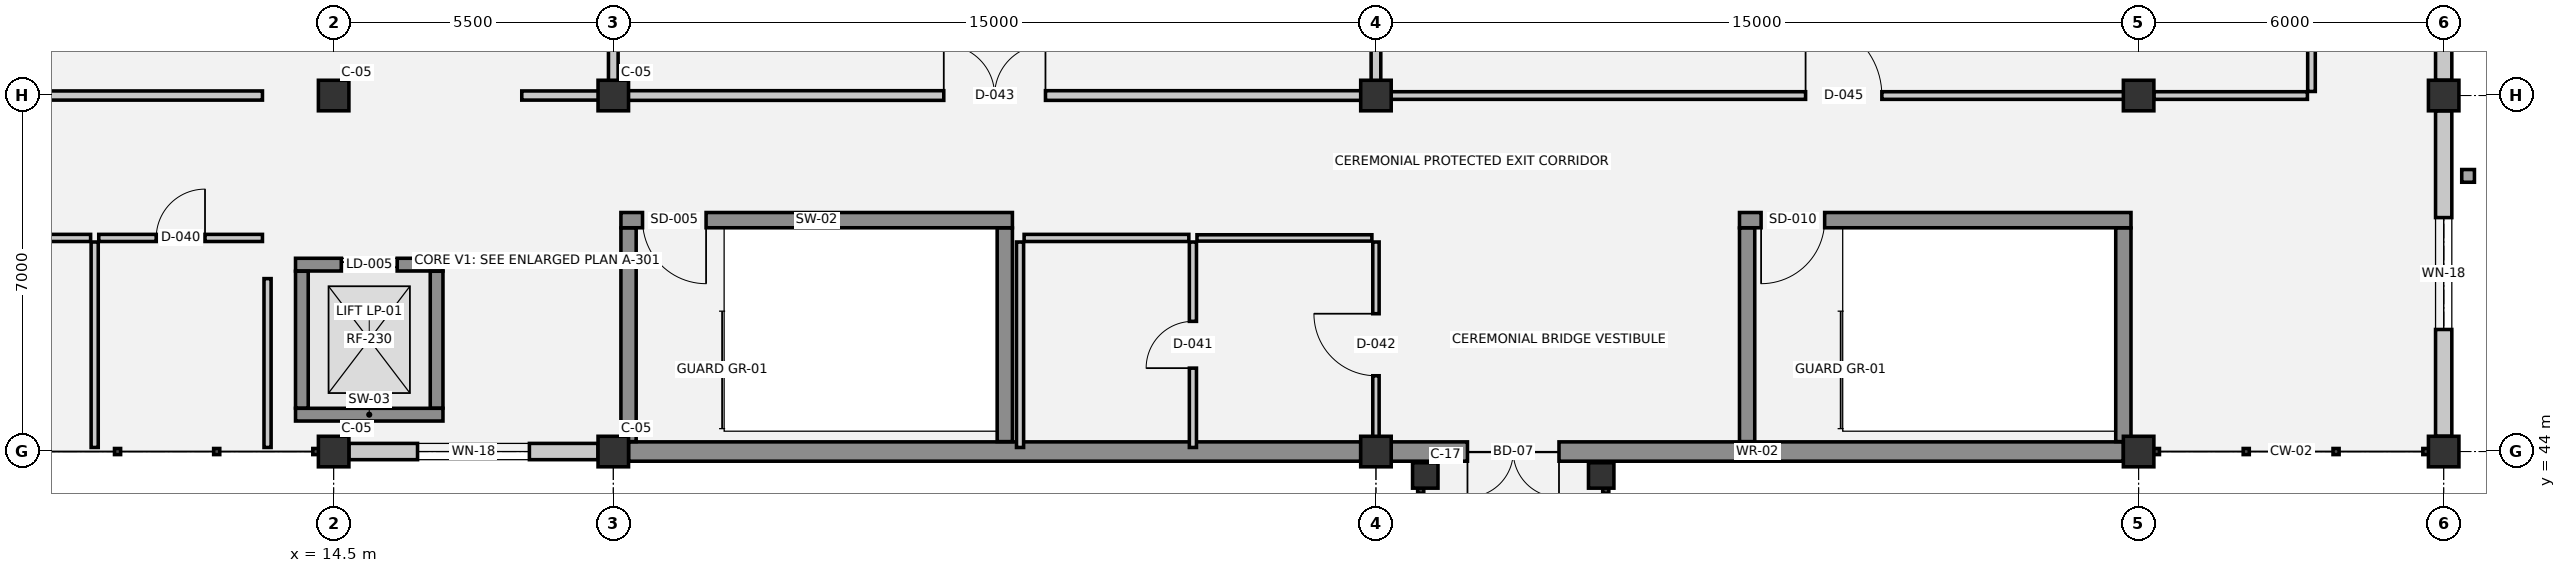
"""IFC4 building model, lengths in metres.
Left out: names, types, materials, properties, quantities, classifications, styles, units other than length and angle.
Written with IfcOpenShell. Run it as: python <this file> out.ifc"""

import sys

from ifc_helpers import new_model, si_unit, direction, frame, frame_2d, origin, origin_2d, place, context, subcontext, project, spatial, rectangle, extrude, element, fill, save


model = new_model("IFC4")
c1 = context("Model", 3, precision=1e-05, world=origin(), true_north=direction((0.0, 1.0)))
c2 = subcontext(c1, "Body", "Model", "MODEL_VIEW")
j1 = project(units=[si_unit("LENGTHUNIT", "METRE"), si_unit("PLANEANGLEUNIT", "RADIAN")], contexts=[c1])
p1 = place(None, origin())
s1 = spatial("IfcSite", under=j1, at=p1, CompositionType="ELEMENT")
p2 = place(p1, origin())
s2 = spatial("IfcBuilding", under=s1, at=p2, CompositionType="ELEMENT")
p3 = place(p2, frame((0.0, 0.0, 14.4)))
s3 = spatial("IfcBuildingStorey", under=s2, at=p3, CompositionType="ELEMENT", Elevation=14.4)
for number, where, z_axis, x_axis in (
    (1, (14.5, 44.0, 0.0), (0.0, 0.0, 1.0), (1.0, 0.0, 0.0)),
    (2, (14.5, 51.0, 0.0), (0.0, 0.0, 1.0), (1.0, 0.0, 0.0)),
    (3, (20.0, 44.0, 0.0), (0.0, 0.0, 1.0), (1.0, 0.0, 0.0)),
    (4, (20.0, 51.0, 0.0), (0.0, 0.0, 1.0), (1.0, 0.0, 0.0)),
    (5, (35.0, 44.0, 0.0), (0.0, 0.0, 1.0), (1.0, 0.0, 0.0)),
    (6, (35.0, 51.0, 0.0), (0.0, 0.0, 1.0), (1.0, 0.0, 0.0)),
    (7, (50.0, 44.0, 0.0), (0.0, 0.0, 1.0), (1.0, 0.0, 0.0)),
    (8, (50.0, 51.0, 0.0), (0.0, 0.0, 1.0), (1.0, 0.0, 0.0)),
    (9, (56.0, 44.0, 0.0), (0.0, 0.0, 1.0), (1.0, 0.0, 0.0)),
    (10, (56.0, 51.0, 0.0), (0.0, 0.0, 1.0), (1.0, 0.0, 0.0)),
):
    element("IfcColumn", number, at=place(p3, frame(where, z_axis=z_axis, x_axis=x_axis)), inside=s3, PredefinedType="COLUMN", context=c2, shape_type="SweptSolid", body=[
        extrude(rectangle(XDim=0.6, YDim=0.6, at=origin_2d()), origin(), (0.0, 0.0, 1.0), 3.9),
    ])
for number, where, z_axis, x_axis in (
    (11, (35.97, 43.53, 0.0), (0.0, 0.0, 1.0), (1.0, 0.0, 0.0)),
    (12, (39.43, 43.53, 0.0), (0.0, 0.0, 1.0), (1.0, 0.0, 0.0)),
):
    element("IfcColumn", number, at=place(p3, frame(where, z_axis=z_axis, x_axis=x_axis)), inside=s3, PredefinedType="COLUMN", context=c2, shape_type="SweptSolid", body=[
        extrude(rectangle(XDim=0.5, YDim=0.5, at=origin_2d()), origin(), (0.0, 0.0, 1.0), 3.67),
    ])
p4 = place(p3, frame((56.0, 64.7, 0.0), z_axis=(0.0, 0.0, 1.0), x_axis=(0.0, -1.0, 0.0)))
e13 = element("IfcWall", 13, at=p4, inside=s3, PredefinedType="SOLIDWALL", context=c2, shape_type="SweptSolid", body=[
    extrude(rectangle(XDim=13.4, YDim=0.32, at=frame_2d((6.7, 0.0))), origin(), (0.0, 0.0, 1.0), 2.46),
])
p5 = place(p4, frame((9.975, 0.0, 0.0)))
e14 = element("IfcOpeningElement", 14, at=p5, cuts=e13, PredefinedType="OPENING", context=c2, shape_type="SweptSolid", body=[
    extrude(rectangle(XDim=1.65, YDim=2.2, at=frame_2d((0.825, 1.1))), frame((0.0, 0.17, 0.0), z_axis=(0.0, -1.0, 0.0), x_axis=(1.0, 0.0, 0.0)), (0.0, 0.0, 1.0), 0.34),
])
p6 = place(p3, frame((56.0, 50.7, 0.0), z_axis=(0.0, 0.0, 1.0), x_axis=(0.0, -1.0, 0.0)))
e15 = element("IfcWall", 15, at=p6, inside=s3, PredefinedType="SOLIDWALL", context=c2, shape_type="SweptSolid", body=[
    extrude(rectangle(XDim=6.4, YDim=0.32, at=frame_2d((3.2, 0.0))), origin(), (0.0, 0.0, 1.0), 2.46),
])
p7 = place(p6, frame((2.1, 0.0, 0.9)))
e16 = element("IfcOpeningElement", 16, at=p7, cuts=e15, PredefinedType="OPENING", context=c2, shape_type="SweptSolid", body=[
    extrude(rectangle(XDim=2.2, YDim=1.0, at=frame_2d((1.1, 0.5))), frame((0.0, 0.17, 0.0), z_axis=(0.0, -1.0, 0.0), x_axis=(1.0, 0.0, 0.0)), (0.0, 0.0, 1.0), 0.34),
])
p8 = place(p3, frame((49.7, 44.0, 0.0), z_axis=(0.0, 0.0, 1.0), x_axis=(-1.0, 0.0, 0.0)))
e17 = element("IfcWall", 17, at=p8, inside=s3, PredefinedType="STANDARD", context=c2, shape_type="SweptSolid", body=[
    extrude(rectangle(XDim=14.4, YDim=0.38, at=frame_2d((7.2, 0.0))), origin(), (0.0, 0.0, 1.0), 2.46),
])
p9 = place(p8, frame((11.1, 0.0, 0.0)))
e18 = element("IfcOpeningElement", 18, at=p9, cuts=e17, PredefinedType="OPENING", context=c2, shape_type="SweptSolid", body=[
    extrude(rectangle(XDim=1.8, YDim=2.25, at=frame_2d((0.9, 1.125))), frame((0.0, 0.2, 0.0), z_axis=(0.0, -1.0, 0.0), x_axis=(1.0, 0.0, 0.0)), (0.0, 0.0, 1.0), 0.4),
])
p10 = place(p3, frame((34.7, 44.0, 0.0), z_axis=(0.0, 0.0, 1.0), x_axis=(-1.0, 0.0, 0.0)))
e19 = element("IfcWall", 19, at=p10, inside=s3, PredefinedType="STANDARD", context=c2, shape_type="SweptSolid", body=[
    extrude(rectangle(XDim=14.4, YDim=0.38, at=frame_2d((7.2, 0.0))), origin(), (0.0, 0.0, 1.0), 2.46),
])
p11 = place(p3, frame((19.7, 44.0, 0.0), z_axis=(0.0, 0.0, 1.0), x_axis=(-1.0, 0.0, 0.0)))
e20 = element("IfcWall", 20, at=p11, inside=s3, PredefinedType="SOLIDWALL", context=c2, shape_type="SweptSolid", body=[
    extrude(rectangle(XDim=4.9, YDim=0.32, at=frame_2d((2.45, 0.0))), origin(), (0.0, 0.0, 1.0), 2.46),
])
p12 = place(p11, frame((1.35, 0.0, 0.9)))
e21 = element("IfcOpeningElement", 21, at=p12, cuts=e20, PredefinedType="OPENING", context=c2, shape_type="SweptSolid", body=[
    extrude(rectangle(XDim=2.2, YDim=1.0, at=frame_2d((1.1, 0.5))), frame((0.0, 0.17, 0.0), z_axis=(0.0, -1.0, 0.0), x_axis=(1.0, 0.0, 0.0)), (0.0, 0.0, 1.0), 0.34),
])
p13 = place(p3, frame((13.75, 44.725, 0.0), z_axis=(0.0, 0.0, 1.0), x_axis=(1.0, 0.0, 0.0)))
e22 = element("IfcWall", 22, at=p13, inside=s3, PredefinedType="SHEAR", context=c2, shape_type="SweptSolid", body=[
    extrude(rectangle(XDim=2.9, YDim=0.25, at=frame_2d((1.45, 0.0))), origin(), (0.0, 0.0, 1.0), 3.27),
])
p14 = place(p3, frame((16.65, 47.675, 0.0), z_axis=(0.0, 0.0, 1.0), x_axis=(-1.0, 0.0, 0.0)))
e23 = element("IfcWall", 23, at=p14, inside=s3, PredefinedType="SHEAR", context=c2, shape_type="SweptSolid", body=[
    extrude(rectangle(XDim=2.9, YDim=0.25, at=frame_2d((1.45, 0.0))), origin(), (0.0, 0.0, 1.0), 3.27),
])
p15 = place(p14, frame((0.9, 0.0, 0.0)))
e24 = element("IfcOpeningElement", 24, at=p15, cuts=e23, PredefinedType="OPENING", context=c2, shape_type="SweptSolid", body=[
    extrude(rectangle(XDim=1.1, YDim=2.15, at=frame_2d((0.55, 1.075))), frame((0.0, 0.135, 0.0), z_axis=(0.0, -1.0, 0.0), x_axis=(1.0, 0.0, 0.0)), (0.0, 0.0, 1.0), 0.27),
])
for number, where, z_axis, x_axis in (
    (25, (13.875, 47.545, 0.0), (0.0, 0.0, 1.0), (0.0, -1.0, 0.0)),
    (26, (16.525, 44.855, 0.0), (0.0, 0.0, 1.0), (0.0, 1.0, 0.0)),
):
    element("IfcWall", number, at=place(p3, frame(where, z_axis=z_axis, x_axis=x_axis)), inside=s3, PredefinedType="SHEAR", context=c2, shape_type="SweptSolid", body=[
        extrude(rectangle(XDim=2.69, YDim=0.25, at=frame_2d((1.345, 0.0))), origin(), (0.0, 0.0, 1.0), 3.27),
    ])
p16 = place(p3, frame((27.85, 48.55, 0.0), z_axis=(0.0, 0.0, 1.0), x_axis=(-1.0, 0.0, 0.0)))
e27 = element("IfcWall", 27, at=p16, inside=s3, PredefinedType="SHEAR", context=c2, shape_type="SweptSolid", body=[
    extrude(rectangle(XDim=7.7, YDim=0.3, at=frame_2d((3.85, 0.0))), origin(), (0.0, 0.0, 1.0), 3.62),
])
p17 = place(p16, frame((6.025, 0.0, 0.0)))
e28 = element("IfcOpeningElement", 28, at=p17, cuts=e27, PredefinedType="OPENING", context=c2, shape_type="SweptSolid", body=[
    extrude(rectangle(XDim=1.25, YDim=2.15, at=frame_2d((0.625, 1.075))), frame((0.0, 0.16, 0.0), z_axis=(0.0, -1.0, 0.0), x_axis=(1.0, 0.0, 0.0)), (0.0, 0.0, 1.0), 0.32),
])
for number, where, z_axis, x_axis in (
    (29, (20.3, 48.395, 0.0), (0.0, 0.0, 1.0), (0.0, -1.0, 0.0)),
    (30, (27.7, 44.195, 0.0), (0.0, 0.0, 1.0), (0.0, 1.0, 0.0)),
):
    element("IfcWall", number, at=place(p3, frame(where, z_axis=z_axis, x_axis=x_axis)), inside=s3, PredefinedType="SHEAR", context=c2, shape_type="SweptSolid", body=[
        extrude(rectangle(XDim=4.2, YDim=0.3, at=frame_2d((2.1, 0.0))), origin(), (0.0, 0.0, 1.0), 3.62),
    ])
p18 = place(p3, frame((49.85, 48.55, 0.0), z_axis=(0.0, 0.0, 1.0), x_axis=(-1.0, 0.0, 0.0)))
e31 = element("IfcWall", 31, at=p18, inside=s3, PredefinedType="SHEAR", context=c2, shape_type="SweptSolid", body=[
    extrude(rectangle(XDim=7.7, YDim=0.3, at=frame_2d((3.85, 0.0))), origin(), (0.0, 0.0, 1.0), 3.62),
])
p19 = place(p18, frame((6.025, 0.0, 0.0)))
e32 = element("IfcOpeningElement", 32, at=p19, cuts=e31, PredefinedType="OPENING", context=c2, shape_type="SweptSolid", body=[
    extrude(rectangle(XDim=1.25, YDim=2.15, at=frame_2d((0.625, 1.075))), frame((0.0, 0.16, 0.0), z_axis=(0.0, -1.0, 0.0), x_axis=(1.0, 0.0, 0.0)), (0.0, 0.0, 1.0), 0.32),
])
for number, where, z_axis, x_axis in (
    (33, (42.3, 48.395, 0.0), (0.0, 0.0, 1.0), (0.0, -1.0, 0.0)),
    (34, (49.7, 44.195, 0.0), (0.0, 0.0, 1.0), (0.0, 1.0, 0.0)),
):
    element("IfcWall", number, at=place(p3, frame(where, z_axis=z_axis, x_axis=x_axis)), inside=s3, PredefinedType="SHEAR", context=c2, shape_type="SweptSolid", body=[
        extrude(rectangle(XDim=4.2, YDim=0.3, at=frame_2d((2.1, 0.0))), origin(), (0.0, 0.0, 1.0), 3.62),
    ])
p20 = place(p3, frame((6.08, 48.2, 0.0), z_axis=(0.0, 0.0, 1.0), x_axis=(1.0, 0.0, 0.0)))
e35 = element("IfcWall", 35, at=p20, inside=s3, PredefinedType="PLUMBINGWALL", context=c2, shape_type="SweptSolid", body=[
    extrude(rectangle(XDim=3.64, YDim=0.14, at=frame_2d((1.82, 0.0))), origin(), (0.0, 0.0, 1.0), 3.54),
])
p21 = place(p20, frame((1.36, 0.0, 0.0)))
e36 = element("IfcOpeningElement", 36, at=p21, cuts=e35, PredefinedType="OPENING", context=c2, shape_type="SweptSolid", body=[
    extrude(rectangle(XDim=0.92, YDim=2.1, at=frame_2d((0.46, 1.05))), frame((0.0, 0.08, 0.0), z_axis=(0.0, -1.0, 0.0), x_axis=(1.0, 0.0, 0.0)), (0.0, 0.0, 1.0), 0.16),
])
p22 = place(p3, frame((9.88, 48.2, 0.0), z_axis=(0.0, 0.0, 1.0), x_axis=(1.0, 0.0, 0.0)))
e37 = element("IfcWall", 37, at=p22, inside=s3, PredefinedType="PLUMBINGWALL", context=c2, shape_type="SweptSolid", body=[
    extrude(rectangle(XDim=3.22, YDim=0.14, at=frame_2d((1.61, 0.0))), origin(), (0.0, 0.0, 1.0), 3.54),
])
p23 = place(p22, frame((1.13, 0.0, 0.0)))
e38 = element("IfcOpeningElement", 38, at=p23, cuts=e37, PredefinedType="OPENING", context=c2, shape_type="SweptSolid", body=[
    extrude(rectangle(XDim=0.96, YDim=2.1, at=frame_2d((0.48, 1.05))), frame((0.0, 0.08, 0.0), z_axis=(0.0, -1.0, 0.0), x_axis=(1.0, 0.0, 0.0)), (0.0, 0.0, 1.0), 0.16),
])
p24 = place(p3, frame((28.08, 48.2, 0.0), z_axis=(0.0, 0.0, 1.0), x_axis=(1.0, 0.0, 0.0)))
e39 = element("IfcWall", 39, at=p24, inside=s3, PredefinedType="PLUMBINGWALL", context=c2, shape_type="SweptSolid", body=[
    extrude(rectangle(XDim=3.24, YDim=0.14, at=frame_2d((1.62, 0.0))), origin(), (0.0, 0.0, 1.0), 3.54),
])
p25 = place(p3, frame((31.48, 48.2, 0.0), z_axis=(0.0, 0.0, 1.0), x_axis=(1.0, 0.0, 0.0)))
e40 = element("IfcWall", 40, at=p25, inside=s3, PredefinedType="PARTITIONING", context=c2, shape_type="SweptSolid", body=[
    extrude(rectangle(XDim=3.44, YDim=0.125, at=frame_2d((1.72, 0.0))), origin(), (0.0, 0.0, 1.0), 3.54),
])
p26 = place(p3, frame((6.08, 51.0, 0.0), z_axis=(0.0, 0.0, 1.0), x_axis=(1.0, 0.0, 0.0)))
e41 = element("IfcWall", 41, at=p26, inside=s3, PredefinedType="PARTITIONING", context=c2, shape_type="SweptSolid", body=[
    extrude(rectangle(XDim=7.02, YDim=0.18, at=frame_2d((3.51, 0.0))), origin(), (0.0, 0.0, 1.0), 2.83),
])
p27 = place(p3, frame((18.2, 51.0, 0.0), z_axis=(0.0, 0.0, 1.0), x_axis=(1.0, 0.0, 0.0)))
e42 = element("IfcWall", 42, at=p27, inside=s3, PredefinedType="PARTITIONING", context=c2, shape_type="SweptSolid", body=[
    extrude(rectangle(XDim=1.72, YDim=0.18, at=frame_2d((0.86, 0.0))), origin(), (0.0, 0.0, 1.0), 2.83),
])
p28 = place(p3, frame((20.08, 51.0, 0.0), z_axis=(0.0, 0.0, 1.0), x_axis=(1.0, 0.0, 0.0)))
e43 = element("IfcWall", 43, at=p28, inside=s3, PredefinedType="PARTITIONING", context=c2, shape_type="SweptSolid", body=[
    extrude(rectangle(XDim=14.84, YDim=0.19, at=frame_2d((7.42, 0.0))), origin(), (0.0, 0.0, 1.0), 2.63),
])
p29 = place(p28, frame((6.42, 0.0, 0.0)))
e44 = element("IfcOpeningElement", 44, at=p29, cuts=e43, PredefinedType="OPENING", context=c2, shape_type="SweptSolid", body=[
    extrude(rectangle(XDim=2.0, YDim=2.35, at=frame_2d((1.0, 1.175))), frame((0.0, 0.105, 0.0), z_axis=(0.0, -1.0, 0.0), x_axis=(1.0, 0.0, 0.0)), (0.0, 0.0, 1.0), 0.21),
])
p30 = place(p3, frame((35.08, 51.0, 0.0), z_axis=(0.0, 0.0, 1.0), x_axis=(1.0, 0.0, 0.0)))
e45 = element("IfcWall", 45, at=p30, inside=s3, PredefinedType="PARTITIONING", context=c2, shape_type="SweptSolid", body=[
    extrude(rectangle(XDim=15.22, YDim=0.15, at=frame_2d((7.61, 0.0))), origin(), (0.0, 0.0, 1.0), 2.63),
])
p31 = place(p30, frame((8.37, 0.0, 0.0)))
e46 = element("IfcOpeningElement", 46, at=p31, cuts=e45, PredefinedType="OPENING", context=c2, shape_type="SweptSolid", body=[
    extrude(rectangle(XDim=1.5, YDim=2.25, at=frame_2d((0.75, 1.125))), frame((0.0, 0.085, 0.0), z_axis=(0.0, -1.0, 0.0), x_axis=(1.0, 0.0, 0.0)), (0.0, 0.0, 1.0), 0.17),
])
p32 = place(p3, frame((50.3, 51.0, 0.0), z_axis=(0.0, 0.0, 1.0), x_axis=(1.0, 0.0, 0.0)))
e47 = element("IfcWall", 47, at=p32, inside=s3, PredefinedType="PARTITIONING", context=c2, shape_type="SweptSolid", body=[
    extrude(rectangle(XDim=3.02, YDim=0.15, at=frame_2d((1.51, 0.0))), origin(), (0.0, 0.0, 1.0), 2.83),
])
p33 = place(p3, frame((9.8, 44.08, 0.0), z_axis=(0.0, 0.0, 1.0), x_axis=(0.0, 1.0, 0.0)))
e48 = element("IfcWall", 48, at=p33, inside=s3, PredefinedType="PLUMBINGWALL", context=c2, shape_type="SweptSolid", body=[
    extrude(rectangle(XDim=4.04, YDim=0.14, at=frame_2d((2.02, 0.0))), origin(), (0.0, 0.0, 1.0), 3.54),
])
p34 = place(p3, frame((13.2, 44.08, 0.0), z_axis=(0.0, 0.0, 1.0), x_axis=(0.0, 1.0, 0.0)))
e49 = element("IfcWall", 49, at=p34, inside=s3, PredefinedType="PLUMBINGWALL", context=c2, shape_type="SweptSolid", body=[
    extrude(rectangle(XDim=3.32, YDim=0.14, at=frame_2d((1.66, 0.0))), origin(), (0.0, 0.0, 1.0), 3.54),
])
p35 = place(p3, frame((20.0, 51.08, 0.0), z_axis=(0.0, 0.0, 1.0), x_axis=(0.0, 1.0, 0.0)))
e50 = element("IfcWall", 50, at=p35, inside=s3, PredefinedType="PARTITIONING", context=c2, shape_type="SweptSolid", body=[
    extrude(rectangle(XDim=13.84, YDim=0.19, at=frame_2d((6.92, 0.0))), origin(), (0.0, 0.0, 1.0), 2.48),
])
p36 = place(p3, frame((28.0, 44.08, 0.0), z_axis=(0.0, 0.0, 1.0), x_axis=(0.0, 1.0, 0.0)))
e51 = element("IfcWall", 51, at=p36, inside=s3, PredefinedType="PLUMBINGWALL", context=c2, shape_type="SweptSolid", body=[
    extrude(rectangle(XDim=4.04, YDim=0.14, at=frame_2d((2.02, 0.0))), origin(), (0.0, 0.0, 1.0), 3.54),
])
p37 = place(p3, frame((31.4, 44.08, 0.0), z_axis=(0.0, 0.0, 1.0), x_axis=(0.0, 1.0, 0.0)))
e52 = element("IfcWall", 52, at=p37, inside=s3, PredefinedType="PLUMBINGWALL", context=c2, shape_type="SweptSolid", body=[
    extrude(rectangle(XDim=4.04, YDim=0.14, at=frame_2d((2.02, 0.0))), origin(), (0.0, 0.0, 1.0), 3.54),
])
p38 = place(p37, frame((1.56, 0.0, 0.0)))
e53 = element("IfcOpeningElement", 53, at=p38, cuts=e52, PredefinedType="OPENING", context=c2, shape_type="SweptSolid", body=[
    extrude(rectangle(XDim=0.92, YDim=2.1, at=frame_2d((0.46, 1.05))), frame((0.0, 0.08, 0.0), z_axis=(0.0, -1.0, 0.0), x_axis=(1.0, 0.0, 0.0)), (0.0, 0.0, 1.0), 0.16),
])
p39 = place(p3, frame((35.0, 44.08, 0.0), z_axis=(0.0, 0.0, 1.0), x_axis=(0.0, 1.0, 0.0)))
e54 = element("IfcWall", 54, at=p39, inside=s3, PredefinedType="PARTITIONING", context=c2, shape_type="SweptSolid", body=[
    extrude(rectangle(XDim=4.04, YDim=0.125, at=frame_2d((2.02, 0.0))), origin(), (0.0, 0.0, 1.0), 2.93),
])
p40 = place(p39, frame((1.41, 0.0, 0.0)))
e55 = element("IfcOpeningElement", 55, at=p40, cuts=e54, PredefinedType="OPENING", context=c2, shape_type="SweptSolid", body=[
    extrude(rectangle(XDim=1.22, YDim=2.2, at=frame_2d((0.61, 1.1))), frame((0.0, 0.073, 0.0), z_axis=(0.0, -1.0, 0.0), x_axis=(1.0, 0.0, 0.0)), (0.0, 0.0, 1.0), 0.145),
])
p41 = place(p3, frame((35.0, 51.08, 0.0), z_axis=(0.0, 0.0, 1.0), x_axis=(0.0, 1.0, 0.0)))
e56 = element("IfcWall", 56, at=p41, inside=s3, PredefinedType="PARTITIONING", context=c2, shape_type="SweptSolid", body=[
    extrude(rectangle(XDim=13.84, YDim=0.19, at=frame_2d((6.92, 0.0))), origin(), (0.0, 0.0, 1.0), 2.48),
])
p42 = place(p3, frame((53.4, 51.08, 0.0), z_axis=(0.0, 0.0, 1.0), x_axis=(0.0, 1.0, 0.0)))
e57 = element("IfcWall", 57, at=p42, inside=s3, PredefinedType="PARTITIONING", context=c2, shape_type="SweptSolid", body=[
    extrude(rectangle(XDim=13.84, YDim=0.15, at=frame_2d((6.92, 0.0))), origin(), (0.0, 0.0, 1.0), 3.54),
])
p43 = place(p7, origin())
e58 = element("IfcWindow", 58, at=p43, inside=s3, PartitioningType="SINGLE_PANEL", PredefinedType="WINDOW", context=c2, shape_type="SweptSolid", body=[
    extrude(rectangle(XDim=2.2, YDim=1.0, at=frame_2d((1.1, 0.5))), frame((0.0, 0.03, 0.0), z_axis=(0.0, -1.0, 0.0), x_axis=(1.0, 0.0, 0.0)), (0.0, 0.0, 1.0), 0.06),
])
fill(e16, e58)
p44 = place(p9, origin())
e59 = element("IfcDoor", 59, at=p44, inside=s3, OperationType="DOUBLE_DOOR_SINGLE_SWING", PredefinedType="DOOR", context=c2, shape_type="SweptSolid", body=[
    extrude(rectangle(XDim=1.8, YDim=2.25, at=frame_2d((0.9, 1.125))), frame((0.0, 0.025, 0.0), z_axis=(0.0, -1.0, 0.0), x_axis=(1.0, 0.0, 0.0)), (0.0, 0.0, 1.0), 0.05),
])
fill(e18, e59)
p45 = place(p12, origin())
e60 = element("IfcWindow", 60, at=p45, inside=s3, PartitioningType="SINGLE_PANEL", PredefinedType="WINDOW", context=c2, shape_type="SweptSolid", body=[
    extrude(rectangle(XDim=2.2, YDim=1.0, at=frame_2d((1.1, 0.5))), frame((0.0, 0.03, 0.0), z_axis=(0.0, -1.0, 0.0), x_axis=(1.0, 0.0, 0.0)), (0.0, 0.0, 1.0), 0.06),
])
fill(e21, e60)
p46 = place(p15, origin())
e61 = element("IfcDoor", 61, at=p46, inside=s3, OperationType="DOUBLE_DOOR_SLIDING", PredefinedType="DOOR", context=c2, shape_type="SweptSolid", body=[
    extrude(rectangle(XDim=1.1, YDim=2.15, at=frame_2d((0.55, 1.075))), frame((0.0, 0.025, 0.0), z_axis=(0.0, -1.0, 0.0), x_axis=(1.0, 0.0, 0.0)), (0.0, 0.0, 1.0), 0.05),
])
fill(e24, e61)
p47 = place(p17, origin())
e62 = element("IfcDoor", 62, at=p47, inside=s3, OperationType="SINGLE_SWING_LEFT", PredefinedType="DOOR", context=c2, shape_type="SweptSolid", body=[
    extrude(rectangle(XDim=1.25, YDim=2.15, at=frame_2d((0.625, 1.075))), frame((0.0, 0.025, 0.0), z_axis=(0.0, -1.0, 0.0), x_axis=(1.0, 0.0, 0.0)), (0.0, 0.0, 1.0), 0.05),
])
fill(e28, e62)
p48 = place(p19, origin())
e63 = element("IfcDoor", 63, at=p48, inside=s3, OperationType="SINGLE_SWING_RIGHT", PredefinedType="DOOR", context=c2, shape_type="SweptSolid", body=[
    extrude(rectangle(XDim=1.25, YDim=2.15, at=frame_2d((0.625, 1.075))), frame((0.0, 0.025, 0.0), z_axis=(0.0, -1.0, 0.0), x_axis=(1.0, 0.0, 0.0)), (0.0, 0.0, 1.0), 0.05),
])
fill(e32, e63)
p49 = place(p23, origin())
e64 = element("IfcDoor", 64, at=p49, inside=s3, OperationType="SINGLE_SWING_RIGHT", PredefinedType="DOOR", context=c2, shape_type="SweptSolid", body=[
    extrude(rectangle(XDim=0.96, YDim=2.1, at=frame_2d((0.48, 1.05))), frame((0.0, 0.025, 0.0), z_axis=(0.0, -1.0, 0.0), x_axis=(1.0, 0.0, 0.0)), (0.0, 0.0, 1.0), 0.05),
])
fill(e38, e64)
p50 = place(p38, origin())
e65 = element("IfcDoor", 65, at=p50, inside=s3, OperationType="SINGLE_SWING_LEFT", PredefinedType="DOOR", context=c2, shape_type="SweptSolid", body=[
    extrude(rectangle(XDim=0.92, YDim=2.1, at=frame_2d((0.46, 1.05))), frame((0.0, 0.025, 0.0), z_axis=(0.0, -1.0, 0.0), x_axis=(1.0, 0.0, 0.0)), (0.0, 0.0, 1.0), 0.05),
])
fill(e53, e65)
p51 = place(p40, origin())
e66 = element("IfcDoor", 66, at=p51, inside=s3, OperationType="SINGLE_SWING_RIGHT", PredefinedType="DOOR", context=c2, shape_type="SweptSolid", body=[
    extrude(rectangle(XDim=1.22, YDim=2.2, at=frame_2d((0.61, 1.1))), frame((0.0, 0.025, 0.0), z_axis=(0.0, -1.0, 0.0), x_axis=(1.0, 0.0, 0.0)), (0.0, 0.0, 1.0), 0.05),
])
fill(e55, e66)
p52 = place(p29, origin())
e67 = element("IfcDoor", 67, at=p52, inside=s3, OperationType="DOUBLE_DOOR_SINGLE_SWING", PredefinedType="DOOR", context=c2, shape_type="SweptSolid", body=[
    extrude(rectangle(XDim=2.0, YDim=2.35, at=frame_2d((1.0, 1.175))), frame((0.0, 0.025, 0.0), z_axis=(0.0, -1.0, 0.0), x_axis=(1.0, 0.0, 0.0)), (0.0, 0.0, 1.0), 0.05),
])
fill(e44, e67)
p53 = place(p31, origin())
e68 = element("IfcDoor", 68, at=p53, inside=s3, OperationType="SINGLE_SWING_LEFT", PredefinedType="DOOR", context=c2, shape_type="SweptSolid", body=[
    extrude(rectangle(XDim=1.5, YDim=2.25, at=frame_2d((0.75, 1.125))), frame((0.0, 0.025, 0.0), z_axis=(0.0, -1.0, 0.0), x_axis=(1.0, 0.0, 0.0)), (0.0, 0.0, 1.0), 0.05),
])
fill(e46, e68)
save(model, sys.argv[1])
